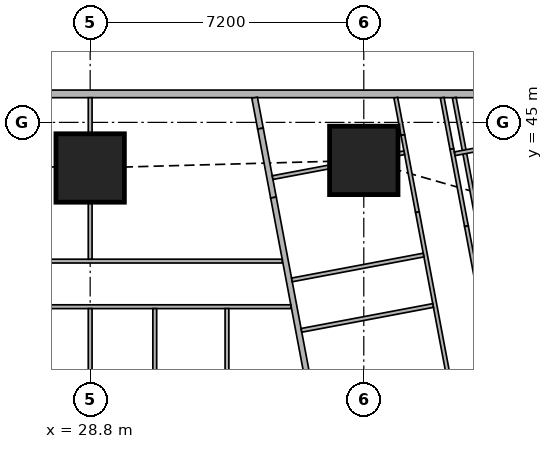
"""IFC4 building model, lengths in metres.
Left out: names, types, materials, properties, quantities, classifications, styles, units other than length and angle.
Written with IfcOpenShell. Run it as: python <this file> out.ifc"""

import sys

from ifc_helpers import new_model, si_unit, direction, frame, frame_2d, origin, origin_2d, place, context, subcontext, project, spatial, rectangle, extrude, element, fill, save


model = new_model("IFC4")
c1 = context("Model", 3, precision=1e-05, world=origin(), true_north=direction((0.0, 1.0)))
c2 = subcontext(c1, "Body", "Model", "MODEL_VIEW")
j1 = project(units=[si_unit("LENGTHUNIT", "METRE"), si_unit("PLANEANGLEUNIT", "RADIAN")], contexts=[c1])
p1 = place(None, origin())
s1 = spatial("IfcSite", under=j1, at=p1, CompositionType="ELEMENT")
p2 = place(p1, origin())
s2 = spatial("IfcBuilding", under=s1, at=p2, CompositionType="ELEMENT")
p3 = place(p2, frame((0.0, 0.0, 139.55)))
s3 = spatial("IfcBuildingStorey", under=s2, at=p3, CompositionType="ELEMENT", Elevation=139.55)
for number, where, z_axis, x_axis in (
    (1, (28.8, 43.8, 0.0), (0.0, 0.0, 1.0), (1.0, 0.0, 0.0)),
    (2, (36.0, 44.0, 0.0), (0.0, 0.0, 1.0), (1.0, 0.0, 0.0)),
):
    element("IfcColumn", number, at=place(p3, frame(where, z_axis=z_axis, x_axis=x_axis)), inside=s3, PredefinedType="COLUMN", context=c2, shape_type="SweptSolid", body=[
        extrude(rectangle(XDim=1.8, YDim=1.8, at=origin_2d()), origin(), (0.0, 0.0, 1.0), 3.75),
    ])
p4 = place(p3, frame((40.106, 45.75, 0.0), z_axis=(0.0, 0.0, 1.0), x_axis=(-1.0, 0.0, 0.0)))
e3 = element("IfcWall", 3, at=p4, inside=s3, PredefinedType="SOLIDWALL", context=c2, shape_type="SweptSolid", body=[
    extrude(rectangle(XDim=37.943, YDim=0.2, at=frame_2d((18.971, 0.0))), origin(), (0.0, 0.0, 1.0), 3.5),
])
p5 = place(p4, frame((8.606, 0.0, 0.9)))
e4 = element("IfcOpeningElement", 4, at=p5, cuts=e3, PredefinedType="OPENING", context=c2, shape_type="SweptSolid", body=[
    extrude(rectangle(XDim=1.8, YDim=1.5, at=frame_2d((0.9, 0.75))), frame((0.0, 0.11, 0.0), z_axis=(0.0, -1.0, 0.0), x_axis=(1.0, 0.0, 0.0)), (0.0, 0.0, 1.0), 0.22),
])
p6 = place(p4, frame((12.206, 0.0, 0.9)))
e5 = element("IfcOpeningElement", 5, at=p6, cuts=e3, PredefinedType="OPENING", context=c2, shape_type="SweptSolid", body=[
    extrude(rectangle(XDim=1.8, YDim=1.5, at=frame_2d((0.9, 0.75))), frame((0.0, 0.11, 0.0), z_axis=(0.0, -1.0, 0.0), x_axis=(1.0, 0.0, 0.0)), (0.0, 0.0, 1.0), 0.22),
])
p7 = place(p4, frame((15.806, 0.0, 0.9)))
e6 = element("IfcOpeningElement", 6, at=p7, cuts=e3, PredefinedType="OPENING", context=c2, shape_type="SweptSolid", body=[
    extrude(rectangle(XDim=1.8, YDim=1.5, at=frame_2d((0.9, 0.75))), frame((0.0, 0.11, 0.0), z_axis=(0.0, -1.0, 0.0), x_axis=(1.0, 0.0, 0.0)), (0.0, 0.0, 1.0), 0.22),
])
p8 = place(p4, frame((19.406, 0.0, 0.9)))
e7 = element("IfcOpeningElement", 7, at=p8, cuts=e3, PredefinedType="OPENING", context=c2, shape_type="SweptSolid", body=[
    extrude(rectangle(XDim=1.8, YDim=1.5, at=frame_2d((0.9, 0.75))), frame((0.0, 0.11, 0.0), z_axis=(0.0, -1.0, 0.0), x_axis=(1.0, 0.0, 0.0)), (0.0, 0.0, 1.0), 0.22),
])
p9 = place(p4, frame((23.006, 0.0, 0.9)))
e8 = element("IfcOpeningElement", 8, at=p9, cuts=e3, PredefinedType="OPENING", context=c2, shape_type="SweptSolid", body=[
    extrude(rectangle(XDim=1.8, YDim=1.5, at=frame_2d((0.9, 0.75))), frame((0.0, 0.11, 0.0), z_axis=(0.0, -1.0, 0.0), x_axis=(1.0, 0.0, 0.0)), (0.0, 0.0, 1.0), 0.22),
])
p10 = place(p4, frame((26.606, 0.0, 0.9)))
e9 = element("IfcOpeningElement", 9, at=p10, cuts=e3, PredefinedType="OPENING", context=c2, shape_type="SweptSolid", body=[
    extrude(rectangle(XDim=1.8, YDim=1.5, at=frame_2d((0.9, 0.75))), frame((0.0, 0.11, 0.0), z_axis=(0.0, -1.0, 0.0), x_axis=(1.0, 0.0, 0.0)), (0.0, 0.0, 1.0), 0.22),
])
p11 = place(p3, frame((33.127, 45.65, 0.0), z_axis=(0.0, 0.0, 1.0), x_axis=(0.186176514576, -0.982516313056, 0.0)))
e10 = element("IfcWall", 10, at=p11, inside=s3, PredefinedType="SOLIDWALL", context=c2, shape_type="SweptSolid", body=[
    extrude(rectangle(XDim=0.827, YDim=0.15, at=frame_2d((0.414, 0.0))), origin(), (0.0, 0.0, 1.0), 3.5),
])
p12 = place(p3, frame((33.281, 44.837, 0.0), z_axis=(0.0, 0.0, 1.0), x_axis=(0.185198323004, -0.982701165745, 0.0)))
e11 = element("IfcWall", 11, at=p12, inside=s3, PredefinedType="SOLIDWALL", context=c2, shape_type="SweptSolid", body=[
    extrude(rectangle(XDim=1.847, YDim=0.15, at=frame_2d((0.923, 0.0))), origin(), (0.0, 0.0, 1.0), 2.1),
])
p13 = place(p3, frame((33.623, 43.022, 0.0), z_axis=(0.0, 0.0, 1.0), x_axis=(0.185596841028, -0.98262597798, 0.0)))
e12 = element("IfcWall", 12, at=p13, inside=s3, PredefinedType="SOLIDWALL", context=c2, shape_type="SweptSolid", body=[
    extrude(rectangle(XDim=41.66, YDim=0.15, at=frame_2d((20.83, 0.0))), origin(), (0.0, 0.0, 1.0), 2.5),
])
p14 = place(p13, frame((20.242, 0.0, 0.0)))
e13 = element("IfcOpeningElement", 13, at=p14, cuts=e12, PredefinedType="OPENING", context=c2, shape_type="SweptSolid", body=[
    extrude(rectangle(XDim=1.0, YDim=2.1, at=frame_2d((0.5, 1.05))), frame((0.0, 0.085, 0.0), z_axis=(0.0, -1.0, 0.0), x_axis=(1.0, 0.0, 0.0)), (0.0, 0.0, 1.0), 0.17),
])
p15 = place(p13, frame((24.714, 0.0, 0.0)))
e14 = element("IfcOpeningElement", 14, at=p15, cuts=e12, PredefinedType="OPENING", context=c2, shape_type="SweptSolid", body=[
    extrude(rectangle(XDim=1.0, YDim=2.1, at=frame_2d((0.5, 1.05))), frame((0.0, 0.085, 0.0), z_axis=(0.0, -1.0, 0.0), x_axis=(1.0, 0.0, 0.0)), (0.0, 0.0, 1.0), 0.17),
])
p16 = place(p13, frame((31.206, 0.0, 0.0)))
e15 = element("IfcOpeningElement", 15, at=p16, cuts=e12, PredefinedType="OPENING", context=c2, shape_type="SweptSolid", body=[
    extrude(rectangle(XDim=1.0, YDim=2.1, at=frame_2d((0.5, 1.05))), frame((0.0, 0.085, 0.0), z_axis=(0.0, -1.0, 0.0), x_axis=(1.0, 0.0, 0.0)), (0.0, 0.0, 1.0), 0.17),
])
p17 = place(p3, frame((39.054, 42.085, 0.0), z_axis=(0.0, 0.0, 1.0), x_axis=(-0.185791584218, 0.982589175207, 0.0)))
e16 = element("IfcWall", 16, at=p17, inside=s3, PredefinedType="PARTITIONING", context=c2, shape_type="SweptSolid", body=[
    extrude(rectangle(XDim=3.628, YDim=0.1, at=frame_2d((1.814, 0.0))), origin(), (0.0, 0.0, 1.0), 2.1),
])
p18 = place(p3, frame((38.063, 45.65, 0.0), z_axis=(0.0, 0.0, 1.0), x_axis=(0.185456359766, -0.982652501458, 0.0)))
e17 = element("IfcWall", 17, at=p18, inside=s3, PredefinedType="PARTITIONING", context=c2, shape_type="SweptSolid", body=[
    extrude(rectangle(XDim=1.376, YDim=0.1, at=frame_2d((0.688, 0.0))), origin(), (0.0, 0.0, 1.0), 3.5),
])
p19 = place(p3, frame((38.318, 44.298, 0.0), z_axis=(0.0, 0.0, 1.0), x_axis=(0.185481135188, -0.982647825261, 0.0)))
e18 = element("IfcWall", 18, at=p19, inside=s3, PredefinedType="PARTITIONING", context=c2, shape_type="SweptSolid", body=[
    extrude(rectangle(XDim=2.064, YDim=0.1, at=frame_2d((1.032, 0.0))), origin(), (0.0, 0.0, 1.0), 2.1),
])
p20 = place(p3, frame((38.701, 42.27, 0.0), z_axis=(0.0, 0.0, 1.0), x_axis=(0.185640619081, -0.98261770824, 0.0)))
e19 = element("IfcWall", 19, at=p20, inside=s3, PredefinedType="PARTITIONING", context=c2, shape_type="SweptSolid", body=[
    extrude(rectangle(XDim=17.103, YDim=0.1, at=frame_2d((8.552, 0.0))), origin(), (0.0, 0.0, 1.0), 2.5),
])
p21 = place(p20, frame((16.053, 0.0, 0.0)))
e20 = element("IfcOpeningElement", 20, at=p21, cuts=e19, PredefinedType="OPENING", context=c2, shape_type="SweptSolid", body=[
    extrude(rectangle(XDim=0.9, YDim=2.1, at=frame_2d((0.45, 1.05))), frame((0.0, 0.06, 0.0), z_axis=(0.0, -1.0, 0.0), x_axis=(1.0, 0.0, 0.0)), (0.0, 0.0, 1.0), 0.12),
])
p22 = place(p20, frame((12.077, 0.0, 0.0)))
e21 = element("IfcOpeningElement", 21, at=p22, cuts=e19, PredefinedType="OPENING", context=c2, shape_type="SweptSolid", body=[
    extrude(rectangle(XDim=0.9, YDim=2.1, at=frame_2d((0.45, 1.05))), frame((0.0, 0.06, 0.0), z_axis=(0.0, -1.0, 0.0), x_axis=(1.0, 0.0, 0.0)), (0.0, 0.0, 1.0), 0.12),
])
p23 = place(p20, frame((8.42, 0.0, 0.0)))
e22 = element("IfcOpeningElement", 22, at=p23, cuts=e19, PredefinedType="OPENING", context=c2, shape_type="SweptSolid", body=[
    extrude(rectangle(XDim=0.9, YDim=2.1, at=frame_2d((0.45, 1.05))), frame((0.0, 0.06, 0.0), z_axis=(0.0, -1.0, 0.0), x_axis=(1.0, 0.0, 0.0)), (0.0, 0.0, 1.0), 0.12),
])
p24 = place(p20, frame((4.444, 0.0, 0.0)))
e23 = element("IfcOpeningElement", 23, at=p24, cuts=e19, PredefinedType="OPENING", context=c2, shape_type="SweptSolid", body=[
    extrude(rectangle(XDim=0.9, YDim=2.1, at=frame_2d((0.45, 1.05))), frame((0.0, 0.06, 0.0), z_axis=(0.0, -1.0, 0.0), x_axis=(1.0, 0.0, 0.0)), (0.0, 0.0, 1.0), 0.12),
])
p25 = place(p3, frame((36.842, 45.65, 0.0), z_axis=(0.0, 0.0, 1.0), x_axis=(0.185789875365, -0.982589498322, 0.0)))
e24 = element("IfcWall", 24, at=p25, inside=s3, PredefinedType="PARTITIONING", context=c2, shape_type="SweptSolid", body=[
    extrude(rectangle(XDim=1.001, YDim=0.1, at=frame_2d((0.5, 0.0))), origin(), (0.0, 0.0, 1.0), 3.5),
])
p26 = place(p3, frame((37.028, 44.666, 0.0), z_axis=(0.0, 0.0, 1.0), x_axis=(0.185481135188, -0.982647825261, 0.0)))
e25 = element("IfcWall", 25, at=p26, inside=s3, PredefinedType="PARTITIONING", context=c2, shape_type="SweptSolid", body=[
    extrude(rectangle(XDim=2.064, YDim=0.1, at=frame_2d((1.032, 0.0))), origin(), (0.0, 0.0, 1.0), 2.1),
])
p27 = place(p3, frame((37.411, 42.638, 0.0), z_axis=(0.0, 0.0, 1.0), x_axis=(0.185555586706, -0.982633769134, 0.0)))
e26 = element("IfcWall", 26, at=p27, inside=s3, PredefinedType="PARTITIONING", context=c2, shape_type="SweptSolid", body=[
    extrude(rectangle(XDim=17.704, YDim=0.1, at=frame_2d((8.852, 0.0))), origin(), (0.0, 0.0, 1.0), 2.5),
])
p28 = place(p27, frame((16.28, 0.0, 0.0)))
e27 = element("IfcOpeningElement", 27, at=p28, cuts=e26, PredefinedType="OPENING", context=c2, shape_type="SweptSolid", body=[
    extrude(rectangle(XDim=0.9, YDim=2.1, at=frame_2d((0.45, 1.05))), frame((0.0, 0.06, 0.0), z_axis=(0.0, -1.0, 0.0), x_axis=(1.0, 0.0, 0.0)), (0.0, 0.0, 1.0), 0.12),
])
p29 = place(p27, frame((12.688, 0.0, 0.0)))
e28 = element("IfcOpeningElement", 28, at=p29, cuts=e26, PredefinedType="OPENING", context=c2, shape_type="SweptSolid", body=[
    extrude(rectangle(XDim=0.9, YDim=2.1, at=frame_2d((0.45, 1.05))), frame((0.0, 0.06, 0.0), z_axis=(0.0, -1.0, 0.0), x_axis=(1.0, 0.0, 0.0)), (0.0, 0.0, 1.0), 0.12),
])
p30 = place(p27, frame((8.822, 0.0, 0.0)))
e29 = element("IfcOpeningElement", 29, at=p30, cuts=e26, PredefinedType="OPENING", context=c2, shape_type="SweptSolid", body=[
    extrude(rectangle(XDim=0.9, YDim=2.1, at=frame_2d((0.45, 1.05))), frame((0.0, 0.06, 0.0), z_axis=(0.0, -1.0, 0.0), x_axis=(1.0, 0.0, 0.0)), (0.0, 0.0, 1.0), 0.12),
])
p31 = place(p27, frame((3.188, 0.0, 0.0)))
e30 = element("IfcOpeningElement", 30, at=p31, cuts=e26, PredefinedType="OPENING", context=c2, shape_type="SweptSolid", body=[
    extrude(rectangle(XDim=0.9, YDim=2.1, at=frame_2d((0.45, 1.05))), frame((0.0, 0.06, 0.0), z_axis=(0.0, -1.0, 0.0), x_axis=(1.0, 0.0, 0.0)), (0.0, 0.0, 1.0), 0.12),
])
p32 = place(p27, frame((0.15, 0.0, 0.0)))
e31 = element("IfcOpeningElement", 31, at=p32, cuts=e26, PredefinedType="OPENING", context=c2, shape_type="SweptSolid", body=[
    extrude(rectangle(XDim=0.9, YDim=2.1, at=frame_2d((0.45, 1.05))), frame((0.0, 0.06, 0.0), z_axis=(0.0, -1.0, 0.0), x_axis=(1.0, 0.0, 0.0)), (0.0, 0.0, 1.0), 0.12),
])
p33 = place(p27, frame((14.371, 0.0, 0.0)))
e32 = element("IfcOpeningElement", 32, at=p33, cuts=e26, PredefinedType="OPENING", context=c2, shape_type="SweptSolid", body=[
    extrude(rectangle(XDim=0.9, YDim=2.1, at=frame_2d((0.45, 1.05))), frame((0.0, 0.06, 0.0), z_axis=(0.0, -1.0, 0.0), x_axis=(1.0, 0.0, 0.0)), (0.0, 0.0, 1.0), 0.12),
])
p34 = place(p27, frame((10.78, 0.0, 0.0)))
e33 = element("IfcOpeningElement", 33, at=p34, cuts=e26, PredefinedType="OPENING", context=c2, shape_type="SweptSolid", body=[
    extrude(rectangle(XDim=0.9, YDim=2.1, at=frame_2d((0.45, 1.05))), frame((0.0, 0.06, 0.0), z_axis=(0.0, -1.0, 0.0), x_axis=(1.0, 0.0, 0.0)), (0.0, 0.0, 1.0), 0.12),
])
p35 = place(p27, frame((6.154, 0.0, 0.0)))
e34 = element("IfcOpeningElement", 34, at=p35, cuts=e26, PredefinedType="OPENING", context=c2, shape_type="SweptSolid", body=[
    extrude(rectangle(XDim=0.9, YDim=2.1, at=frame_2d((0.45, 1.05))), frame((0.0, 0.06, 0.0), z_axis=(0.0, -1.0, 0.0), x_axis=(1.0, 0.0, 0.0)), (0.0, 0.0, 1.0), 0.12),
])
p36 = place(p3, frame((41.968, 44.85, 0.0), z_axis=(0.0, 0.0, 1.0), x_axis=(-0.98258614234, -0.185807623311, 0.0)))
e35 = element("IfcWall", 35, at=p36, inside=s3, PredefinedType="PARTITIONING", context=c2, shape_type="SweptSolid", body=[
    extrude(rectangle(XDim=3.638, YDim=0.1, at=frame_2d((1.819, 0.0))), origin(), (0.0, 0.0, 1.0), 2.1),
])
p37 = place(p3, frame((37.065, 44.201, 0.0), z_axis=(0.0, 0.0, 1.0), x_axis=(-0.983168876381, -0.182699098288, 0.0)))
e36 = element("IfcWall", 36, at=p37, inside=s3, PredefinedType="PARTITIONING", context=c2, shape_type="SweptSolid", body=[
    extrude(rectangle(XDim=0.158, YDim=0.1, at=frame_2d((0.079, 0.0))), origin(), (0.0, 0.0, 1.0), 2.1),
])
p38 = place(p3, frame((35.09, 43.828, 0.0), z_axis=(0.0, 0.0, 1.0), x_axis=(-0.982683801717, -0.185290436461, 0.0)))
e37 = element("IfcWall", 37, at=p38, inside=s3, PredefinedType="PARTITIONING", context=c2, shape_type="SweptSolid", body=[
    extrude(rectangle(XDim=1.515, YDim=0.1, at=frame_2d((0.758, 0.0))), origin(), (0.0, 0.0, 1.0), 2.1),
])
p39 = place(p3, frame((37.824, 40.182, 0.0), z_axis=(0.0, 0.0, 1.0), x_axis=(-0.982648794755, -0.185475998897, 0.0)))
e38 = element("IfcWall", 38, at=p39, inside=s3, PredefinedType="PARTITIONING", context=c2, shape_type="SweptSolid", body=[
    extrude(rectangle(XDim=3.525, YDim=0.1, at=frame_2d((1.763, 0.0))), origin(), (0.0, 0.0, 1.0), 3.5),
])
p40 = place(p3, frame((21.6, 41.35, 0.0), z_axis=(0.0, 0.0, 1.0), x_axis=(1.0, 0.0, 0.0)))
e39 = element("IfcWall", 39, at=p40, inside=s3, PredefinedType="PARTITIONING", context=c2, shape_type="SweptSolid", body=[
    extrude(rectangle(XDim=12.253, YDim=0.1, at=frame_2d((6.126, 0.0))), origin(), (0.0, 0.0, 1.0), 3.5),
])
p41 = place(p40, frame((0.2, 0.0, 0.0)))
e40 = element("IfcOpeningElement", 40, at=p41, cuts=e39, PredefinedType="OPENING", context=c2, shape_type="SweptSolid", body=[
    extrude(rectangle(XDim=0.9, YDim=2.1, at=frame_2d((0.45, 1.05))), frame((0.0, 0.06, 0.0), z_axis=(0.0, -1.0, 0.0), x_axis=(1.0, 0.0, 0.0)), (0.0, 0.0, 1.0), 0.12),
])
p42 = place(p40, frame((3.8, 0.0, 0.0)))
e41 = element("IfcOpeningElement", 41, at=p42, cuts=e39, PredefinedType="OPENING", context=c2, shape_type="SweptSolid", body=[
    extrude(rectangle(XDim=0.9, YDim=2.1, at=frame_2d((0.45, 1.05))), frame((0.0, 0.06, 0.0), z_axis=(0.0, -1.0, 0.0), x_axis=(1.0, 0.0, 0.0)), (0.0, 0.0, 1.0), 0.12),
])
p43 = place(p40, frame((7.4, 0.0, 0.0)))
e42 = element("IfcOpeningElement", 42, at=p43, cuts=e39, PredefinedType="OPENING", context=c2, shape_type="SweptSolid", body=[
    extrude(rectangle(XDim=0.9, YDim=2.1, at=frame_2d((0.45, 1.05))), frame((0.0, 0.06, 0.0), z_axis=(0.0, -1.0, 0.0), x_axis=(1.0, 0.0, 0.0)), (0.0, 0.0, 1.0), 0.12),
])
p44 = place(p3, frame((21.6, 40.15, 0.0), z_axis=(0.0, 0.0, 1.0), x_axis=(1.0, 0.0, 0.0)))
e43 = element("IfcWall", 43, at=p44, inside=s3, PredefinedType="PARTITIONING", context=c2, shape_type="SweptSolid", body=[
    extrude(rectangle(XDim=12.48, YDim=0.1, at=frame_2d((6.24, 0.0))), origin(), (0.0, 0.0, 1.0), 3.5),
])
p45 = place(p44, frame((0.575, 0.0, 0.0)))
e44 = element("IfcOpeningElement", 44, at=p45, cuts=e43, PredefinedType="OPENING", context=c2, shape_type="SweptSolid", body=[
    extrude(rectangle(XDim=0.9, YDim=2.1, at=frame_2d((0.45, 1.05))), frame((0.0, 0.06, 0.0), z_axis=(0.0, -1.0, 0.0), x_axis=(1.0, 0.0, 0.0)), (0.0, 0.0, 1.0), 0.12),
])
p46 = place(p44, frame((3.95, 0.0, 0.0)))
e45 = element("IfcOpeningElement", 45, at=p46, cuts=e43, PredefinedType="OPENING", context=c2, shape_type="SweptSolid", body=[
    extrude(rectangle(XDim=0.9, YDim=2.1, at=frame_2d((0.45, 1.05))), frame((0.0, 0.06, 0.0), z_axis=(0.0, -1.0, 0.0), x_axis=(1.0, 0.0, 0.0)), (0.0, 0.0, 1.0), 0.12),
])
p47 = place(p44, frame((7.6, 0.0, 0.0)))
e46 = element("IfcOpeningElement", 46, at=p47, cuts=e43, PredefinedType="OPENING", context=c2, shape_type="SweptSolid", body=[
    extrude(rectangle(XDim=0.9, YDim=2.1, at=frame_2d((0.45, 1.05))), frame((0.0, 0.06, 0.0), z_axis=(0.0, -1.0, 0.0), x_axis=(1.0, 0.0, 0.0)), (0.0, 0.0, 1.0), 0.12),
])
p48 = place(p44, frame((11.43, 0.0, 0.0)))
e47 = element("IfcOpeningElement", 47, at=p48, cuts=e43, PredefinedType="OPENING", context=c2, shape_type="SweptSolid", body=[
    extrude(rectangle(XDim=0.9, YDim=2.1, at=frame_2d((0.45, 1.05))), frame((0.0, 0.06, 0.0), z_axis=(0.0, -1.0, 0.0), x_axis=(1.0, 0.0, 0.0)), (0.0, 0.0, 1.0), 0.12),
])
p49 = place(p44, frame((2.375, 0.0, 0.0)))
e48 = element("IfcOpeningElement", 48, at=p49, cuts=e43, PredefinedType="OPENING", context=c2, shape_type="SweptSolid", body=[
    extrude(rectangle(XDim=0.9, YDim=2.1, at=frame_2d((0.45, 1.05))), frame((0.0, 0.06, 0.0), z_axis=(0.0, -1.0, 0.0), x_axis=(1.0, 0.0, 0.0)), (0.0, 0.0, 1.0), 0.12),
])
p50 = place(p44, frame((5.75, 0.0, 0.0)))
e49 = element("IfcOpeningElement", 49, at=p50, cuts=e43, PredefinedType="OPENING", context=c2, shape_type="SweptSolid", body=[
    extrude(rectangle(XDim=0.9, YDim=2.1, at=frame_2d((0.45, 1.05))), frame((0.0, 0.06, 0.0), z_axis=(0.0, -1.0, 0.0), x_axis=(1.0, 0.0, 0.0)), (0.0, 0.0, 1.0), 0.12),
])
p51 = place(p44, frame((9.4, 0.0, 0.0)))
e50 = element("IfcOpeningElement", 50, at=p51, cuts=e43, PredefinedType="OPENING", context=c2, shape_type="SweptSolid", body=[
    extrude(rectangle(XDim=0.9, YDim=2.1, at=frame_2d((0.45, 1.05))), frame((0.0, 0.06, 0.0), z_axis=(0.0, -1.0, 0.0), x_axis=(1.0, 0.0, 0.0)), (0.0, 0.0, 1.0), 0.12),
])
p52 = place(p3, frame((28.8, 41.4, 0.0), z_axis=(0.0, 0.0, 1.0), x_axis=(0.0, 1.0, 0.0)))
e51 = element("IfcWall", 51, at=p52, inside=s3, PredefinedType="PARTITIONING", context=c2, shape_type="SweptSolid", body=[
    extrude(rectangle(XDim=1.499, YDim=0.1, at=frame_2d((0.75, 0.0))), origin(), (0.0, 0.0, 1.0), 3.5),
])
p53 = place(p3, frame((28.8, 44.701, 0.0), z_axis=(0.0, 0.0, 1.0), x_axis=(0.0, 1.0, 0.0)))
e52 = element("IfcWall", 52, at=p53, inside=s3, PredefinedType="PARTITIONING", context=c2, shape_type="SweptSolid", body=[
    extrude(rectangle(XDim=0.949, YDim=0.1, at=frame_2d((0.475, 0.0))), origin(), (0.0, 0.0, 1.0), 3.5),
])
p54 = place(p3, frame((28.8, 38.251, 0.0), z_axis=(0.0, 0.0, 1.0), x_axis=(0.0, 1.0, 0.0)))
e53 = element("IfcWall", 53, at=p54, inside=s3, PredefinedType="PARTITIONING", context=c2, shape_type="SweptSolid", body=[
    extrude(rectangle(XDim=1.849, YDim=0.1, at=frame_2d((0.925, 0.0))), origin(), (0.0, 0.0, 1.0), 3.5),
])
for number, where, z_axis, x_axis in (
    (54, (32.4, 36.575, 0.0), (0.0, 0.0, 1.0), (0.0, 1.0, 0.0)),
    (55, (30.5, 36.575, 0.0), (0.0, 0.0, 1.0), (0.0, 1.0, 0.0)),
):
    element("IfcWall", number, at=place(p3, frame(where, z_axis=z_axis, x_axis=x_axis)), inside=s3, PredefinedType="PARTITIONING", context=c2, shape_type="SweptSolid", body=[
        extrude(rectangle(XDim=3.525, YDim=0.1, at=frame_2d((1.763, 0.0))), origin(), (0.0, 0.0, 1.0), 3.5),
    ])
p55 = place(p3, frame((37.573, 41.509, 0.0), z_axis=(0.0, 0.0, 1.0), x_axis=(-0.982638553676, -0.185530247748, 0.0)))
e56 = element("IfcWall", 56, at=p55, inside=s3, PredefinedType="PARTITIONING", context=c2, shape_type="SweptSolid", body=[
    extrude(rectangle(XDim=3.525, YDim=0.1, at=frame_2d((1.763, 0.0))), origin(), (0.0, 0.0, 1.0), 3.5),
])
p56 = place(p55, frame((1.325, 0.0, 0.0)))
e57 = element("IfcOpeningElement", 57, at=p56, cuts=e56, PredefinedType="OPENING", context=c2, shape_type="SweptSolid", body=[
    extrude(rectangle(XDim=0.9, YDim=2.1, at=frame_2d((0.45, 1.05))), frame((0.0, 0.06, 0.0), z_axis=(0.0, -1.0, 0.0), x_axis=(1.0, 0.0, 0.0)), (0.0, 0.0, 1.0), 0.12),
])
p57 = place(p5, origin())
e58 = element("IfcWindow", 58, at=p57, inside=s3, PartitioningType="SINGLE_PANEL", PredefinedType="WINDOW", context=c2, shape_type="SweptSolid", body=[
    extrude(rectangle(XDim=1.8, YDim=1.5, at=frame_2d((0.9, 0.75))), frame((0.0, 0.03, 0.0), z_axis=(0.0, -1.0, 0.0), x_axis=(1.0, 0.0, 0.0)), (0.0, 0.0, 1.0), 0.06),
])
fill(e4, e58)
p58 = place(p6, origin())
e59 = element("IfcWindow", 59, at=p58, inside=s3, PartitioningType="SINGLE_PANEL", PredefinedType="WINDOW", context=c2, shape_type="SweptSolid", body=[
    extrude(rectangle(XDim=1.8, YDim=1.5, at=frame_2d((0.9, 0.75))), frame((0.0, 0.03, 0.0), z_axis=(0.0, -1.0, 0.0), x_axis=(1.0, 0.0, 0.0)), (0.0, 0.0, 1.0), 0.06),
])
fill(e5, e59)
p59 = place(p31, origin())
e60 = element("IfcDoor", 60, at=p59, inside=s3, OperationType="SINGLE_SWING_RIGHT", PredefinedType="DOOR", context=c2, shape_type="SweptSolid", body=[
    extrude(rectangle(XDim=0.9, YDim=2.1, at=frame_2d((0.45, 1.05))), frame((0.0, 0.025, 0.0), z_axis=(0.0, -1.0, 0.0), x_axis=(1.0, 0.0, 0.0)), (0.0, 0.0, 1.0), 0.05),
])
fill(e30, e60)
p60 = place(p32, origin())
e61 = element("IfcDoor", 61, at=p60, inside=s3, OperationType="SINGLE_SWING_RIGHT", PredefinedType="DOOR", context=c2, shape_type="SweptSolid", body=[
    extrude(rectangle(XDim=0.9, YDim=2.1, at=frame_2d((0.45, 1.05))), frame((0.0, 0.025, 0.0), z_axis=(0.0, -1.0, 0.0), x_axis=(1.0, 0.0, 0.0)), (0.0, 0.0, 1.0), 0.05),
])
fill(e31, e61)
p61 = place(p43, origin())
e62 = element("IfcDoor", 62, at=p61, inside=s3, OperationType="SINGLE_SWING_LEFT", PredefinedType="DOOR", context=c2, shape_type="SweptSolid", body=[
    extrude(rectangle(XDim=0.9, YDim=2.1, at=frame_2d((0.45, 1.05))), frame((0.0, 0.025, 0.0), z_axis=(0.0, -1.0, 0.0), x_axis=(1.0, 0.0, 0.0)), (0.0, 0.0, 1.0), 0.05),
])
fill(e42, e62)
p62 = place(p47, origin())
e63 = element("IfcDoor", 63, at=p62, inside=s3, OperationType="SINGLE_SWING_LEFT", PredefinedType="DOOR", context=c2, shape_type="SweptSolid", body=[
    extrude(rectangle(XDim=0.9, YDim=2.1, at=frame_2d((0.45, 1.05))), frame((0.0, 0.025, 0.0), z_axis=(0.0, -1.0, 0.0), x_axis=(1.0, 0.0, 0.0)), (0.0, 0.0, 1.0), 0.05),
])
fill(e46, e63)
p63 = place(p48, origin())
e64 = element("IfcDoor", 64, at=p63, inside=s3, OperationType="SINGLE_SWING_LEFT", PredefinedType="DOOR", context=c2, shape_type="SweptSolid", body=[
    extrude(rectangle(XDim=0.9, YDim=2.1, at=frame_2d((0.45, 1.05))), frame((0.0, 0.025, 0.0), z_axis=(0.0, -1.0, 0.0), x_axis=(1.0, 0.0, 0.0)), (0.0, 0.0, 1.0), 0.05),
])
fill(e47, e64)
p64 = place(p50, origin())
e65 = element("IfcDoor", 65, at=p64, inside=s3, OperationType="SINGLE_SWING_RIGHT", PredefinedType="DOOR", context=c2, shape_type="SweptSolid", body=[
    extrude(rectangle(XDim=0.9, YDim=2.1, at=frame_2d((0.45, 1.05))), frame((0.0, 0.025, 0.0), z_axis=(0.0, -1.0, 0.0), x_axis=(1.0, 0.0, 0.0)), (0.0, 0.0, 1.0), 0.05),
])
fill(e49, e65)
p65 = place(p51, origin())
e66 = element("IfcDoor", 66, at=p65, inside=s3, OperationType="SINGLE_SWING_RIGHT", PredefinedType="DOOR", context=c2, shape_type="SweptSolid", body=[
    extrude(rectangle(XDim=0.9, YDim=2.1, at=frame_2d((0.45, 1.05))), frame((0.0, 0.025, 0.0), z_axis=(0.0, -1.0, 0.0), x_axis=(1.0, 0.0, 0.0)), (0.0, 0.0, 1.0), 0.05),
])
fill(e50, e66)
p66 = place(p56, origin())
e67 = element("IfcDoor", 67, at=p66, inside=s3, OperationType="SINGLE_SWING_LEFT", PredefinedType="DOOR", context=c2, shape_type="SweptSolid", body=[
    extrude(rectangle(XDim=0.9, YDim=2.1, at=frame_2d((0.45, 1.05))), frame((0.0, 0.025, 0.0), z_axis=(0.0, -1.0, 0.0), x_axis=(1.0, 0.0, 0.0)), (0.0, 0.0, 1.0), 0.05),
])
fill(e57, e67)
save(model, sys.argv[1])
